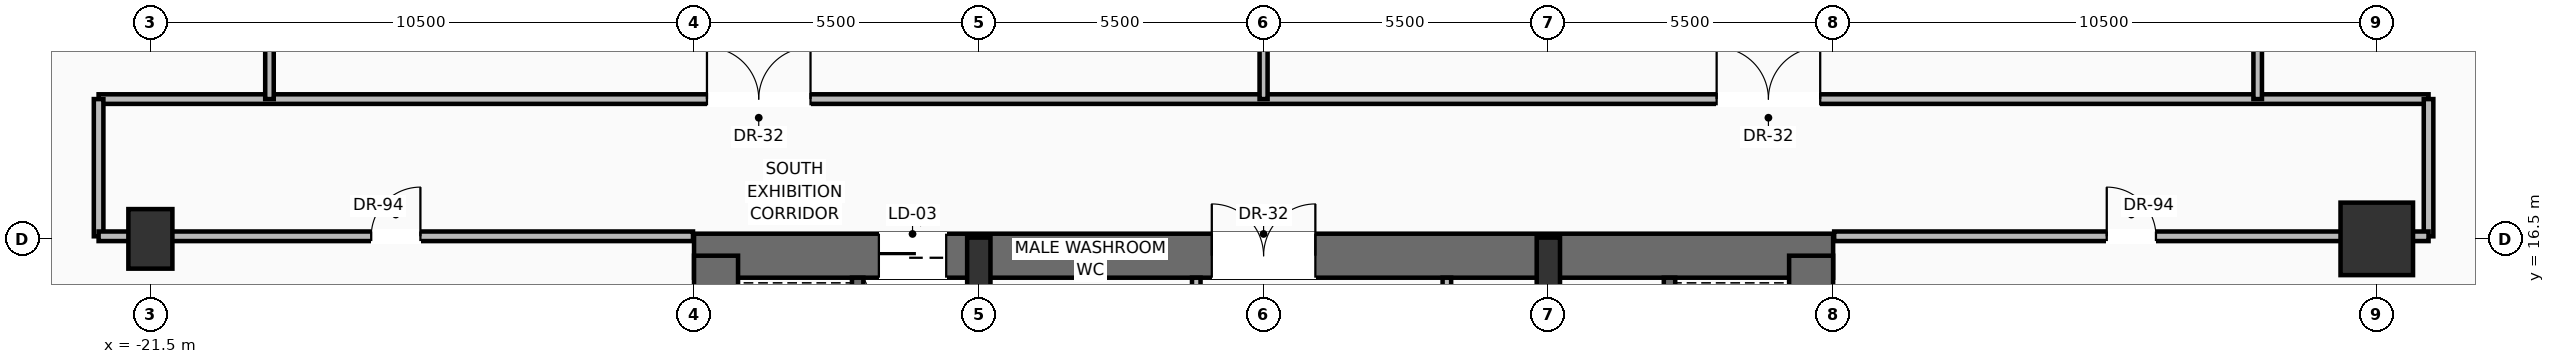
"""IFC4 building model, lengths in metres.
Left out: names, types, materials, properties, quantities, classifications, styles, units other than length and angle.
Written with IfcOpenShell. Run it as: python <this file> out.ifc"""

import sys

from ifc_helpers import new_model, si_unit, direction, frame, frame_2d, origin, origin_2d, place, context, subcontext, project, spatial, rectangle, hollow_rectangle, extrude, source, transform, mapped, element, fill, save


model = new_model("IFC4")
c1 = context("Model", 3, precision=1e-05, world=origin(), true_north=direction((0.0, 1.0)))
c2 = subcontext(c1, "Body", "Model", "MODEL_VIEW")
j1 = project(units=[si_unit("LENGTHUNIT", "METRE"), si_unit("PLANEANGLEUNIT", "RADIAN")], contexts=[c1])
p1 = place(None, origin())
s1 = spatial("IfcSite", under=j1, at=p1, CompositionType="ELEMENT")
p2 = place(p1, origin())
s2 = spatial("IfcBuilding", under=s1, at=p2, CompositionType="ELEMENT")
p3 = place(p2, frame((0.0, 0.0, 11.0)))
s3 = spatial("IfcBuildingStorey", under=s2, at=p3, CompositionType="ELEMENT", Elevation=11.0)
p4 = place(p3, frame((-11.0, 16.175, 0.0), z_axis=(0.0, 0.0, 1.0), x_axis=(1.0, 0.0, 0.0)))
e1 = element("IfcWall", 1, at=p4, inside=s3, PredefinedType="SHEAR", context=c2, shape_type="SweptSolid", body=[
    extrude(rectangle(XDim=22.0, YDim=0.85, at=frame_2d((11.0, 0.0))), origin(), (0.0, 0.0, 1.0), 5.185),
])
p5 = place(p4, frame((3.57, 0.0, 0.0)))
e2 = element("IfcOpeningElement", 2, at=p5, cuts=e1, PredefinedType="OPENING", context=c2, shape_type="SweptSolid", body=[
    extrude(rectangle(XDim=1.3, YDim=2.3, at=frame_2d((0.65, 1.15))), frame((0.0, 0.435, 0.0), z_axis=(0.0, -1.0, 0.0), x_axis=(1.0, 0.0, 0.0)), (0.0, 0.0, 1.0), 0.87),
])
p6 = place(p4, frame((10.0, 0.0, 0.0)))
e3 = element("IfcOpeningElement", 3, at=p6, cuts=e1, PredefinedType="OPENING", context=c2, shape_type="SweptSolid", body=[
    extrude(rectangle(XDim=2.0, YDim=2.4, at=frame_2d((1.0, 1.2))), frame((0.0, 0.435, 0.0), z_axis=(0.0, -1.0, 0.0), x_axis=(1.0, 0.0, 0.0)), (0.0, 0.0, 1.0), 0.87),
])
for number, where, z_axis, x_axis in (
    (4, (-10.575, 0.425, 0.0), (0.0, 0.0, 1.0), (0.0, 1.0, 0.0)),
    (5, (10.575, 0.425, 0.0), (0.0, 0.0, 1.0), (0.0, 1.0, 0.0)),
):
    element("IfcWall", number, at=place(p3, frame(where, z_axis=z_axis, x_axis=x_axis)), inside=s3, PredefinedType="SHEAR", context=c2, shape_type="SweptSolid", body=[
        extrude(rectangle(XDim=15.75, YDim=0.85, at=frame_2d((7.875, 0.0))), origin(), (0.0, 0.0, 1.0), 5.185),
    ])
p7 = place(p3, frame((-5.5, 0.425, 0.0), z_axis=(0.0, 0.0, 1.0), x_axis=(0.0, 1.0, 0.0)))
e6 = element("IfcWall", 6, at=p7, inside=s3, PredefinedType="SHEAR", context=c2, shape_type="SweptSolid", body=[
    extrude(rectangle(XDim=15.75, YDim=0.4, at=frame_2d((7.875, 0.0))), origin(), (0.0, 0.0, 1.0), 5.185),
])
p8 = place(p7, frame((9.075, 0.0, 0.0)))
e7 = element("IfcOpeningElement", 7, at=p8, cuts=e6, PredefinedType="OPENING", context=c2, shape_type="SweptSolid", body=[
    extrude(rectangle(XDim=1.1, YDim=2.2, at=frame_2d((0.55, 1.1))), frame((0.0, 0.21, 0.0), z_axis=(0.0, -1.0, 0.0), x_axis=(1.0, 0.0, 0.0)), (0.0, 0.0, 1.0), 0.42),
])
p9 = place(p3, frame((5.5, 0.425, 0.0), z_axis=(0.0, 0.0, 1.0), x_axis=(0.0, 1.0, 0.0)))
e8 = element("IfcWall", 8, at=p9, inside=s3, PredefinedType="SHEAR", context=c2, shape_type="SweptSolid", body=[
    extrude(rectangle(XDim=15.75, YDim=0.4, at=frame_2d((7.875, 0.0))), origin(), (0.0, 0.0, 1.0), 5.185),
])
p10 = place(p9, frame((9.075, 0.0, 0.0)))
e9 = element("IfcOpeningElement", 9, at=p10, cuts=e8, PredefinedType="OPENING", context=c2, shape_type="SweptSolid", body=[
    extrude(rectangle(XDim=1.1, YDim=2.2, at=frame_2d((0.55, 1.1))), frame((0.0, 0.21, 0.0), z_axis=(0.0, -1.0, 0.0), x_axis=(1.0, 0.0, 0.0)), (0.0, 0.0, 1.0), 0.42),
])
m1 = source(origin(), c2, "Body", "SweptSolid", [
    extrude(rectangle(XDim=0.45, YDim=0.95, at=origin_2d()), origin(), (0.0, 0.0, 1.0), 5.5),
])
for number, where, z_axis, x_axis in (
    (10, (-5.5, 16.05, 0.0), (0.0, 0.0, 1.0), (1.0, 0.0, 0.0)),
    (11, (5.5, 16.05, 0.0), (0.0, 0.0, 1.0), (1.0, 0.0, 0.0)),
):
    element("IfcColumn", number, at=place(p3, frame(where, z_axis=z_axis, x_axis=x_axis)), inside=s3, PredefinedType="PILASTER", context=c2, shape_type="MappedRepresentation", body=[
        mapped(m1, transform((0.0, 0.0, 0.0), scale=1.0)),
    ])
m2 = source(origin(), c2, "Body", "SweptSolid", [
    extrude(rectangle(XDim=0.85, YDim=1.15, at=origin_2d()), origin(), (0.0, 0.0, 1.0), 5.5),
])
p11 = place(p3, frame((-21.5, 16.5, 0.0), z_axis=(0.0, 0.0, 1.0), x_axis=(1.0, 0.0, 0.0)))
e12 = element("IfcColumn", 12, at=p11, inside=s3, PredefinedType="COLUMN", context=c2, shape_type="MappedRepresentation", body=[
    mapped(m2, transform((0.0, 0.0, 0.0), scale=1.0)),
])
m3 = source(origin(), c2, "Body", "SweptSolid", [
    extrude(hollow_rectangle(XDim=1.4, YDim=1.4, WallThickness=0.07, at=origin_2d()), origin(), (0.0, 0.0, 1.0), 5.5),
])
p12 = place(p3, frame((21.5, 16.5, 0.0), z_axis=(0.0, 0.0, 1.0), x_axis=(1.0, 0.0, 0.0)))
e13 = element("IfcColumn", 13, at=p12, inside=s3, PredefinedType="COLUMN", context=c2, shape_type="MappedRepresentation", body=[
    mapped(m3, transform((0.0, 0.0, 0.0), scale=1.0)),
])
for number, where, z_axis, x_axis in (
    (14, (-7.84, 11.87, 0.0), (0.0, 0.0, 1.0), (0.0, 1.0, 0.0)),
    (15, (7.84, 11.87, 0.0), (0.0, 0.0, 1.0), (0.0, 1.0, 0.0)),
):
    element("IfcWall", number, at=place(p3, frame(where, z_axis=z_axis, x_axis=x_axis)), inside=s3, PredefinedType="SOLIDWALL", context=c2, shape_type="SweptSolid", body=[
        extrude(rectangle(XDim=3.88, YDim=0.22, at=frame_2d((1.94, 0.0))), origin(), (0.0, 0.0, 1.0), 5.185),
    ])
p13 = place(p3, frame((-1.3, 13.6, 0.0), z_axis=(0.0, 0.0, 1.0), x_axis=(0.0, 1.0, 0.0)))
e16 = element("IfcWall", 16, at=p13, inside=s3, PredefinedType="PARTITIONING", context=c2, shape_type="SweptSolid", body=[
    extrude(rectangle(XDim=2.15, YDim=0.165, at=frame_2d((1.075, 0.0))), origin(), (0.0, 0.0, 1.0), 5.177),
])
p14 = place(p13, frame((0.55, 0.0, 0.0)))
e17 = element("IfcOpeningElement", 17, at=p14, cuts=e16, PredefinedType="OPENING", context=c2, shape_type="SweptSolid", body=[
    extrude(rectangle(XDim=0.9, YDim=2.1, at=frame_2d((0.45, 1.05))), frame((0.0, 0.093, 0.0), z_axis=(0.0, -1.0, 0.0), x_axis=(1.0, 0.0, 0.0)), (0.0, 0.0, 1.0), 0.185),
])
p15 = place(p3, frame((3.54, 11.22, 0.0), z_axis=(0.0, 0.0, 1.0), x_axis=(0.0, 1.0, 0.0)))
e18 = element("IfcWall", 18, at=p15, inside=s3, PredefinedType="PARTITIONING", context=c2, shape_type="SweptSolid", body=[
    extrude(rectangle(XDim=4.53, YDim=0.165, at=frame_2d((2.265, 0.0))), origin(), (0.0, 0.0, 1.0), 5.177),
])
p16 = place(p15, frame((1.25, 0.0, 0.0)))
e19 = element("IfcOpeningElement", 19, at=p16, cuts=e18, PredefinedType="OPENING", context=c2, shape_type="SweptSolid", body=[
    extrude(rectangle(XDim=0.9, YDim=2.1, at=frame_2d((0.45, 1.05))), frame((0.0, 0.093, 0.0), z_axis=(0.0, -1.0, 0.0), x_axis=(1.0, 0.0, 0.0)), (0.0, 0.0, 1.0), 0.185),
])
p17 = place(p3, frame((-22.5, 19.2, 0.0), z_axis=(0.0, 0.0, 1.0), x_axis=(1.0, 0.0, 0.0)))
e20 = element("IfcWall", 20, at=p17, inside=s3, PredefinedType="PARTITIONING", context=c2, shape_type="SweptSolid", body=[
    extrude(rectangle(XDim=45.0, YDim=0.185, at=frame_2d((22.5, 0.0))), origin(), (0.0, 0.0, 1.0), 4.137),
])
p18 = place(p17, frame((11.75, 0.0, 0.0)))
e21 = element("IfcOpeningElement", 21, at=p18, cuts=e20, PredefinedType="OPENING", context=c2, shape_type="SweptSolid", body=[
    extrude(rectangle(XDim=2.0, YDim=2.4, at=frame_2d((1.0, 1.2))), frame((0.0, 0.103, 0.0), z_axis=(0.0, -1.0, 0.0), x_axis=(1.0, 0.0, 0.0)), (0.0, 0.0, 1.0), 0.205),
])
p19 = place(p17, frame((31.25, 0.0, 0.0)))
e22 = element("IfcOpeningElement", 22, at=p19, cuts=e20, PredefinedType="OPENING", context=c2, shape_type="SweptSolid", body=[
    extrude(rectangle(XDim=2.0, YDim=2.4, at=frame_2d((1.0, 1.2))), frame((0.0, 0.103, 0.0), z_axis=(0.0, -1.0, 0.0), x_axis=(1.0, 0.0, 0.0)), (0.0, 0.0, 1.0), 0.205),
])
for number, where, z_axis, x_axis in (
    (23, (-22.5, 16.55, 0.0), (0.0, 0.0, 1.0), (0.0, 1.0, 0.0)),
    (24, (22.5, 16.55, 0.0), (0.0, 0.0, 1.0), (0.0, 1.0, 0.0)),
):
    element("IfcWall", number, at=place(p3, frame(where, z_axis=z_axis, x_axis=x_axis)), inside=s3, PredefinedType="PARTITIONING", context=c2, shape_type="SweptSolid", body=[
        extrude(rectangle(XDim=2.65, YDim=0.185, at=frame_2d((1.325, 0.0))), origin(), (0.0, 0.0, 1.0), 5.177),
    ])
p20 = place(p3, frame((-22.5, 16.55, 0.0), z_axis=(0.0, 0.0, 1.0), x_axis=(1.0, 0.0, 0.0)))
e25 = element("IfcWall", 25, at=p20, inside=s3, PredefinedType="PARTITIONING", context=c2, shape_type="SweptSolid", body=[
    extrude(rectangle(XDim=11.48, YDim=0.185, at=frame_2d((5.74, 0.0))), origin(), (0.0, 0.0, 1.0), 4.137),
])
p21 = place(p20, frame((5.265, 0.0, 0.0)))
e26 = element("IfcOpeningElement", 26, at=p21, cuts=e25, PredefinedType="OPENING", context=c2, shape_type="SweptSolid", body=[
    extrude(rectangle(XDim=0.95, YDim=2.2, at=frame_2d((0.475, 1.1))), frame((0.0, 0.103, 0.0), z_axis=(0.0, -1.0, 0.0), x_axis=(1.0, 0.0, 0.0)), (0.0, 0.0, 1.0), 0.205),
])
p22 = place(p3, frame((11.02, 16.55, 0.0), z_axis=(0.0, 0.0, 1.0), x_axis=(1.0, 0.0, 0.0)))
e27 = element("IfcWall", 27, at=p22, inside=s3, PredefinedType="PARTITIONING", context=c2, shape_type="SweptSolid", body=[
    extrude(rectangle(XDim=11.48, YDim=0.185, at=frame_2d((5.74, 0.0))), origin(), (0.0, 0.0, 1.0), 4.137),
])
p23 = place(p22, frame((5.265, 0.0, 0.0)))
e28 = element("IfcOpeningElement", 28, at=p23, cuts=e27, PredefinedType="OPENING", context=c2, shape_type="SweptSolid", body=[
    extrude(rectangle(XDim=0.95, YDim=2.2, at=frame_2d((0.475, 1.1))), frame((0.0, 0.103, 0.0), z_axis=(0.0, -1.0, 0.0), x_axis=(1.0, 0.0, 0.0)), (0.0, 0.0, 1.0), 0.205),
])
p24 = place(p3, frame((-19.2, 19.2, 0.0), z_axis=(0.0, 0.0, 1.0), x_axis=(0.0, 1.0, 0.0)))
e29 = element("IfcWall", 29, at=p24, inside=s3, PredefinedType="PARTITIONING", context=c2, shape_type="SweptSolid", body=[
    extrude(rectangle(XDim=20.4, YDim=0.165, at=frame_2d((10.2, 0.0))), origin(), (0.0, 0.0, 1.0), 4.137),
])
p25 = place(p24, frame((8.464, 0.0, 0.0)))
e30 = element("IfcOpeningElement", 30, at=p25, cuts=e29, PredefinedType="OPENING", context=c2, shape_type="SweptSolid", body=[
    extrude(rectangle(XDim=1.5, YDim=2.25, at=frame_2d((0.75, 1.125))), frame((0.0, 0.093, 0.0), z_axis=(0.0, -1.0, 0.0), x_axis=(1.0, 0.0, 0.0)), (0.0, 0.0, 1.0), 0.185),
])
p26 = place(p3, frame((19.2, 19.2, 0.0), z_axis=(0.0, 0.0, 1.0), x_axis=(0.0, 1.0, 0.0)))
e31 = element("IfcWall", 31, at=p26, inside=s3, PredefinedType="PARTITIONING", context=c2, shape_type="SweptSolid", body=[
    extrude(rectangle(XDim=20.4, YDim=0.165, at=frame_2d((10.2, 0.0))), origin(), (0.0, 0.0, 1.0), 4.137),
])
p27 = place(p26, frame((8.464, 0.0, 0.0)))
e32 = element("IfcOpeningElement", 32, at=p27, cuts=e31, PredefinedType="OPENING", context=c2, shape_type="SweptSolid", body=[
    extrude(rectangle(XDim=1.5, YDim=2.25, at=frame_2d((0.75, 1.125))), frame((0.0, 0.093, 0.0), z_axis=(0.0, -1.0, 0.0), x_axis=(1.0, 0.0, 0.0)), (0.0, 0.0, 1.0), 0.185),
])
p28 = place(p3, frame((0.0, 19.2, 0.0), z_axis=(0.0, 0.0, 1.0), x_axis=(0.0, 1.0, 0.0)))
e33 = element("IfcWall", 33, at=p28, inside=s3, PredefinedType="MOVABLE", context=c2, shape_type="SweptSolid", body=[
    extrude(rectangle(XDim=20.4, YDim=0.155, at=frame_2d((10.2, 0.0))), origin(), (0.0, 0.0, 1.0), 4.137),
])
p29 = place(p28, frame((9.45, 0.0, 0.0)))
e34 = element("IfcOpeningElement", 34, at=p29, cuts=e33, PredefinedType="OPENING", context=c2, shape_type="SweptSolid", body=[
    extrude(rectangle(XDim=1.5, YDim=2.25, at=frame_2d((0.75, 1.125))), frame((0.0, 0.087, 0.0), z_axis=(0.0, -1.0, 0.0), x_axis=(1.0, 0.0, 0.0)), (0.0, 0.0, 1.0), 0.175),
])
m4 = source(origin(), c2, "Body", "SweptSolid", [
    extrude(rectangle(XDim=1.3, YDim=2.3, at=frame_2d((0.65, 1.15))), frame((0.0, 0.025, 0.0), z_axis=(0.0, -1.0, 0.0), x_axis=(1.0, 0.0, 0.0)), (0.0, 0.0, 1.0), 0.05),
])
p30 = place(p5, origin())
e35 = element("IfcDoor", 35, at=p30, inside=s3, OperationType="SLIDING_TO_RIGHT", PredefinedType="DOOR", context=c2, shape_type="MappedRepresentation", body=[
    mapped(m4, transform((0.0, 0.0, 0.0), scale=1.0)),
])
fill(e2, e35)
m5 = source(origin(), c2, "Body", "SweptSolid", [
    extrude(rectangle(XDim=2.0, YDim=2.4, at=frame_2d((1.0, 1.2))), frame((0.0, 0.025, 0.0), z_axis=(0.0, -1.0, 0.0), x_axis=(1.0, 0.0, 0.0)), (0.0, 0.0, 1.0), 0.05),
])
p31 = place(p6, origin())
e36 = element("IfcDoor", 36, at=p31, inside=s3, OperationType="DOUBLE_DOOR_SINGLE_SWING", PredefinedType="DOOR", context=c2, shape_type="MappedRepresentation", body=[
    mapped(m5, transform((0.0, 0.0, 0.0), scale=1.0)),
])
fill(e3, e36)
p32 = place(p18, origin())
e37 = element("IfcDoor", 37, at=p32, inside=s3, OperationType="DOUBLE_DOOR_SINGLE_SWING", PredefinedType="DOOR", context=c2, shape_type="MappedRepresentation", body=[
    mapped(m5, transform((0.0, 0.0, 0.0), scale=1.0)),
])
fill(e21, e37)
p33 = place(p19, origin())
e38 = element("IfcDoor", 38, at=p33, inside=s3, OperationType="DOUBLE_DOOR_SINGLE_SWING", PredefinedType="DOOR", context=c2, shape_type="MappedRepresentation", body=[
    mapped(m5, transform((0.0, 0.0, 0.0), scale=1.0)),
])
fill(e22, e38)
m6 = source(origin(), c2, "Body", "SweptSolid", [
    extrude(rectangle(XDim=0.95, YDim=2.2, at=frame_2d((0.475, 1.1))), frame((0.0, 0.025, 0.0), z_axis=(0.0, -1.0, 0.0), x_axis=(1.0, 0.0, 0.0)), (0.0, 0.0, 1.0), 0.05),
])
p34 = place(p21, origin())
e39 = element("IfcDoor", 39, at=p34, inside=s3, OperationType="SINGLE_SWING_RIGHT", PredefinedType="DOOR", context=c2, shape_type="MappedRepresentation", body=[
    mapped(m6, transform((0.0, 0.0, 0.0), scale=1.0)),
])
fill(e26, e39)
p35 = place(p23, origin())
e40 = element("IfcDoor", 40, at=p35, inside=s3, OperationType="SINGLE_SWING_LEFT", PredefinedType="DOOR", context=c2, shape_type="MappedRepresentation", body=[
    mapped(m6, transform((0.0, 0.0, 0.0), scale=1.0)),
])
fill(e28, e40)
save(model, sys.argv[1])
